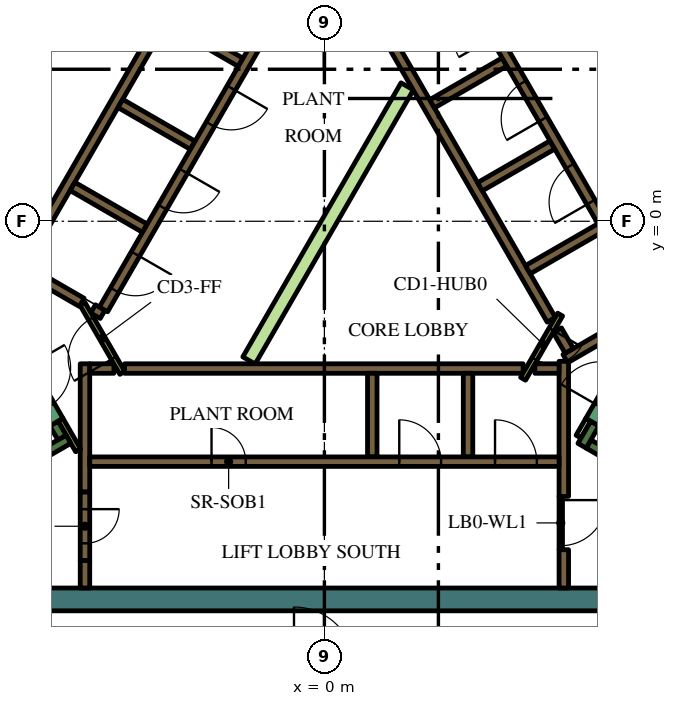
"""IFC4 building model, lengths in metres.
Left out: names, types, materials, properties, quantities, classifications, styles, units other than length and angle.
Written with IfcOpenShell. Run it as: python <this file> out.ifc"""

import sys

from ifc_helpers import new_model, si_unit, direction, frame, frame_2d, origin, place, context, subcontext, project, spatial, polyline, rectangle, outline, extrude, element, fill, save


model = new_model("IFC4")
c1 = context("Model", 3, precision=1e-05, world=origin(), true_north=direction((0.0, 1.0)))
c2 = subcontext(c1, "Body", "Model", "MODEL_VIEW")
j1 = project(units=[si_unit("LENGTHUNIT", "METRE"), si_unit("PLANEANGLEUNIT", "RADIAN")], contexts=[c1])
p1 = place(None, origin())
s1 = spatial("IfcSite", under=j1, at=p1, CompositionType="ELEMENT")
p2 = place(p1, origin())
s2 = spatial("IfcBuilding", under=s1, at=p2, CompositionType="ELEMENT")
p3 = place(p2, frame((0.0, 0.0, 340.2)))
s3 = spatial("IfcBuildingStorey", under=s2, at=p3, CompositionType="ELEMENT", Elevation=340.2)
p4 = place(p3, frame((8.904, -9.95, 0.0), z_axis=(0.0, 0.0, 1.0), x_axis=(-1.0, 0.0, 0.0)))
e1 = element("IfcWall", 1, at=p4, inside=s3, PredefinedType="SOLIDWALL", context=c2, shape_type="SweptSolid", body=[
    extrude(rectangle(XDim=22.161, YDim=0.6, at=frame_2d((11.081, 0.0))), origin(), (0.0, 0.0, 1.0), 4.2),
])
p5 = place(p3, frame((-4.652, 11.842, 0.0), z_axis=(0.0, 0.0, 1.0), x_axis=(-0.500003640647, -0.866023301845, 0.0)))
e2 = element("IfcWall", 2, at=p5, inside=s3, PredefinedType="SOLIDWALL", context=c2, shape_type="SweptSolid", body=[
    extrude(rectangle(XDim=15.858, YDim=0.6, at=frame_2d((7.929, 0.0))), origin(), (0.0, 0.0, 1.0), 4.2),
])
p6 = place(p3, frame((12.84, -9.261, 0.0), z_axis=(0.0, 0.0, 1.0), x_axis=(-0.866013990052, 0.500019768644, 0.0)))
e3 = element("IfcWall", 3, at=p6, inside=s3, PredefinedType="SOLIDWALL", context=c2, shape_type="SweptSolid", body=[
    extrude(rectangle(XDim=6.8, YDim=0.25, at=frame_2d((3.4, 0.0))), origin(), (0.0, 0.0, 1.0), 4.2),
])
p7 = place(p3, frame((6.78, -5.906, 0.0), z_axis=(0.0, 0.0, 1.0), x_axis=(0.500223362819, 0.865896406789, 0.0)))
e4 = element("IfcWall", 4, at=p7, inside=s3, PredefinedType="SOLIDWALL", context=c2, shape_type="SweptSolid", body=[
    extrude(rectangle(XDim=0.675, YDim=0.25, at=frame_2d((0.337, 0.0))), origin(), (0.0, 0.0, 1.0), 4.2),
])
p8 = place(p3, frame((-12.84, -9.261, 0.0), z_axis=(0.0, 0.0, 1.0), x_axis=(0.866016039709, 0.500016218704, 0.0)))
e5 = element("IfcWall", 5, at=p8, inside=s3, PredefinedType="SOLIDWALL", context=c2, shape_type="SweptSolid", body=[
    extrude(rectangle(XDim=7.05, YDim=0.25, at=frame_2d((3.525, 0.0))), origin(), (0.0, 0.0, 1.0), 4.2),
])
p9 = place(p3, frame((-6.905, -5.69, 0.0), z_axis=(0.0, 0.0, 1.0), x_axis=(-0.500402024738, 0.865793170242, 0.0)))
e6 = element("IfcWall", 6, at=p9, inside=s3, PredefinedType="SOLIDWALL", context=c2, shape_type="SweptSolid", body=[
    extrude(rectangle(XDim=0.425, YDim=0.25, at=frame_2d((0.212, 0.0))), origin(), (0.0, 0.0, 1.0), 4.2),
])
p10 = place(p3, frame((6.3, -7.24, 0.0), z_axis=(0.0, 0.0, 1.0), x_axis=(0.0, 1.0, 0.0)))
e7 = element("IfcWall", 7, at=p10, inside=s3, PredefinedType="SOLIDWALL", context=c2, shape_type="SweptSolid", body=[
    extrude(rectangle(XDim=3.556, YDim=0.25, at=frame_2d((1.778, 0.0))), origin(), (0.0, 0.0, 1.0), 4.2),
])
p11 = place(p3, frame((6.3, -9.65, 0.0), z_axis=(0.0, 0.0, 1.0), x_axis=(0.0, 1.0, 0.0)))
e8 = element("IfcWall", 8, at=p11, inside=s3, PredefinedType="SOLIDWALL", context=c2, shape_type="SweptSolid", body=[
    extrude(rectangle(XDim=1.008, YDim=0.25, at=frame_2d((0.504, 0.0))), origin(), (0.0, 0.0, 1.0), 4.2),
])
p12 = place(p3, frame((5.538, -3.875, 0.0), z_axis=(0.0, 0.0, 1.0), x_axis=(1.0, 0.0, 0.0)))
e9 = element("IfcWall", 9, at=p12, inside=s3, PredefinedType="SOLIDWALL", context=c2, shape_type="SweptSolid", body=[
    extrude(rectangle(XDim=0.637, YDim=0.25, at=frame_2d((0.318, 0.0))), origin(), (0.0, 0.0, 1.0), 4.2),
])
p13 = place(p3, frame((-5.259, -3.875, 0.0), z_axis=(0.0, 0.0, 1.0), x_axis=(1.0, 0.0, 0.0)))
e10 = element("IfcWall", 10, at=p13, inside=s3, PredefinedType="SOLIDWALL", context=c2, shape_type="SweptSolid", body=[
    extrude(rectangle(XDim=10.489, YDim=0.25, at=frame_2d((5.244, 0.0))), origin(), (0.0, 0.0, 1.0), 4.2),
])
for number, where, z_axis, x_axis in (
    (11, (1.26, -4.0, 0.0), (0.0, 0.0, 1.0), (0.0, -1.0, 0.0)),
    (12, (3.78, -4.0, 0.0), (0.0, 0.0, 1.0), (0.0, -1.0, 0.0)),
):
    element("IfcWall", number, at=place(p3, frame(where, z_axis=z_axis, x_axis=x_axis)), inside=s3, PredefinedType="SOLIDWALL", context=c2, shape_type="SweptSolid", body=[
        extrude(rectangle(XDim=2.2, YDim=0.25, at=frame_2d((1.1, 0.0))), origin(), (0.0, 0.0, 1.0), 4.2),
    ])
p14 = place(p3, frame((-6.3, -7.125, 0.0), z_axis=(0.0, 0.0, 1.0), x_axis=(0.0, 1.0, 0.0)))
e13 = element("IfcWall", 13, at=p14, inside=s3, PredefinedType="SOLIDWALL", context=c2, shape_type="SweptSolid", body=[
    extrude(rectangle(XDim=3.375, YDim=0.25, at=frame_2d((1.687, 0.0))), origin(), (0.0, 0.0, 1.0), 4.2),
])
p15 = place(p3, frame((-6.175, -3.875, 0.0), z_axis=(0.0, 0.0, 1.0), x_axis=(1.0, 0.0, 0.0)))
e14 = element("IfcWall", 14, at=p15, inside=s3, PredefinedType="SOLIDWALL", context=c2, shape_type="SweptSolid", body=[
    extrude(rectangle(XDim=0.637, YDim=0.25, at=frame_2d((0.318, 0.0))), origin(), (0.0, 0.0, 1.0), 4.2),
])
p16 = place(p3, frame((-6.3, -8.925, 0.0), z_axis=(0.0, 0.0, 1.0), x_axis=(0.0, -1.0, 0.0)))
e15 = element("IfcWall", 15, at=p16, inside=s3, PredefinedType="SOLIDWALL", context=c2, shape_type="SweptSolid", body=[
    extrude(rectangle(XDim=0.725, YDim=0.25, at=frame_2d((0.363, 0.0))), origin(), (0.0, 0.0, 1.0), 4.2),
])
p17 = place(p3, frame((9.19, -1.969, 0.0), z_axis=(0.0, 0.0, 1.0), x_axis=(-0.866057109641, -0.499945079824, 0.0)))
e16 = element("IfcWall", 16, at=p17, inside=s3, PredefinedType="SOLIDWALL", context=c2, shape_type="SweptSolid", body=[
    extrude(rectangle(XDim=3.291, YDim=0.25, at=frame_2d((1.646, 0.0))), origin(), (0.0, 0.0, 1.0), 4.2),
])
p18 = place(p3, frame((6.13, -2.867, 0.0), z_axis=(0.0, 0.0, 1.0), x_axis=(0.500160776593, -0.865932559475, 0.0)))
e17 = element("IfcWall", 17, at=p18, inside=s3, PredefinedType="SOLIDWALL", context=c2, shape_type="SweptSolid", body=[
    extrude(rectangle(XDim=0.627, YDim=0.25, at=frame_2d((0.313, 0.0))), origin(), (0.0, 0.0, 1.0), 4.2),
])
p19 = place(p3, frame((5.97, -2.591, 0.0), z_axis=(0.0, 0.0, 1.0), x_axis=(-0.499994469932, 0.866028596547, 0.0)))
e18 = element("IfcWall", 18, at=p19, inside=s3, PredefinedType="SOLIDWALL", context=c2, shape_type="SweptSolid", body=[
    extrude(rectangle(XDim=10.488, YDim=0.25, at=frame_2d((5.244, 0.0))), origin(), (0.0, 0.0, 1.0), 4.2),
])
for number, where, z_axis, x_axis in (
    (19, (2.834, 3.091, 0.0), (0.0, 0.0, 1.0), (0.866, 0.5, 0.0)),
    (20, (4.094, 0.909, 0.0), (0.0, 0.0, 1.0), (0.866, 0.5, 0.0)),
    (21, (5.354, -1.274, 0.0), (0.0, 0.0, 1.0), (0.866, 0.5, 0.0)),
):
    element("IfcWall", number, at=place(p3, frame(where, z_axis=z_axis, x_axis=x_axis)), inside=s3, PredefinedType="SOLIDWALL", context=c2, shape_type="SweptSolid", body=[
        extrude(rectangle(XDim=2.2, YDim=0.25, at=frame_2d((1.1, 0.0))), origin(), (0.0, 0.0, 1.0), 4.2),
    ])
p20 = place(p3, frame((-8.06, -1.311, 0.0), z_axis=(0.0, 0.0, 1.0), x_axis=(0.50000273126, 0.866023826885, 0.0)))
e22 = element("IfcWall", 22, at=p20, inside=s3, PredefinedType="SOLIDWALL", context=c2, shape_type="SweptSolid", body=[
    extrude(rectangle(XDim=10.33, YDim=0.25, at=frame_2d((5.165, 0.0))), origin(), (0.0, 0.0, 1.0), 4.2),
])
for number, where, z_axis, x_axis in (
    (23, (-2.204, 4.182, 0.0), (0.0, 0.0, 1.0), (-0.866, 0.5, 0.0)),
    (24, (-5.369, 3.1, 0.0), (0.0, 0.0, 1.0), (0.866, -0.5, 0.0)),
    (25, (-4.724, -0.182, 0.0), (0.0, 0.0, 1.0), (-0.866, 0.5, 0.0)),
):
    element("IfcWall", number, at=place(p3, frame(where, z_axis=z_axis, x_axis=x_axis)), inside=s3, PredefinedType="SOLIDWALL", context=c2, shape_type="SweptSolid", body=[
        extrude(rectangle(XDim=2.2, YDim=0.25, at=frame_2d((1.1, 0.0))), origin(), (0.0, 0.0, 1.0), 4.2),
    ])
p21 = place(p3, frame((-6.088, -2.305, 0.0), z_axis=(0.0, 0.0, 1.0), x_axis=(0.866059450854, -0.499941024108, 0.0)))
e26 = element("IfcWall", 26, at=p21, inside=s3, PredefinedType="SOLIDWALL", context=c2, shape_type="SweptSolid", body=[
    extrude(rectangle(XDim=0.29, YDim=0.25, at=frame_2d((0.145, 0.0))), origin(), (0.0, 0.0, 1.0), 4.2),
])
p22 = place(p3, frame((-7.889, -1.265, 0.0), z_axis=(0.0, 0.0, 1.0), x_axis=(0.865986741702, -0.500066958712, 0.0)))
e27 = element("IfcWall", 27, at=p22, inside=s3, PredefinedType="SOLIDWALL", context=c2, shape_type="SweptSolid", body=[
    extrude(rectangle(XDim=1.738, YDim=0.25, at=frame_2d((0.869, 0.0))), origin(), (0.0, 0.0, 1.0), 4.2),
])
p23 = place(p3, frame((-6.48, -6.027, 0.0), z_axis=(0.0, 0.0, 1.0), x_axis=(-0.499927229454, 0.866067413802, 0.0)))
e28 = element("IfcWall", 28, at=p23, inside=s3, PredefinedType="PARTITIONING", context=c2, shape_type="SweptSolid", body=[
    extrude(rectangle(XDim=0.929, YDim=0.15, at=frame_2d((0.464, 0.0))), origin(), (0.0, 0.0, 1.0), 4.2),
])
p24 = place(p3, frame((6.945, -5.222, 0.0), z_axis=(0.0, 0.0, 1.0), x_axis=(-0.499818422106, -0.866130212453, 0.0)))
e29 = element("IfcWall", 29, at=p24, inside=s3, PredefinedType="PARTITIONING", context=c2, shape_type="SweptSolid", body=[
    extrude(rectangle(XDim=0.514, YDim=0.15, at=frame_2d((0.257, 0.0))), origin(), (0.0, 0.0, 1.0), 3.45),
])
p25 = place(p3, origin())
e30 = element("IfcWall", 30, at=p25, inside=s3, PredefinedType="PARTITIONING", context=c2, shape_type="SweptSolid", body=[
    extrude(outline(polyline([(2.017, 3.643), (2.342, 3.456), (-1.822, -3.756), (-2.147, -3.568), (2.017, 3.643)])), origin(), (0.0, 0.0, 1.0), 3.45),
])
p26 = place(p3, frame((-6.175, -6.325, 0.0), z_axis=(0.0, 0.0, 1.0), x_axis=(1.0, 0.0, 0.0)))
e31 = element("IfcWall", 31, at=p26, inside=s3, PredefinedType="SOLIDWALL", context=c2, shape_type="SweptSolid", body=[
    extrude(rectangle(XDim=12.35, YDim=0.25, at=frame_2d((6.175, 0.0))), origin(), (0.0, 0.0, 1.0), 4.2),
])
p27 = place(p26, frame((3.205, 0.0, 0.0)))
e32 = element("IfcOpeningElement", 32, at=p27, cuts=e31, PredefinedType="OPENING", context=c2, shape_type="SweptSolid", body=[
    extrude(rectangle(XDim=0.9, YDim=2.1, at=frame_2d((0.45, 1.05))), frame((0.0, 0.135, 0.0), z_axis=(0.0, -1.0, 0.0), x_axis=(1.0, 0.0, 0.0)), (0.0, 0.0, 1.0), 0.27),
])
p28 = place(p26, frame((8.145, 0.0, 0.0)))
e33 = element("IfcOpeningElement", 33, at=p28, cuts=e31, PredefinedType="OPENING", context=c2, shape_type="SweptSolid", body=[
    extrude(rectangle(XDim=1.1, YDim=2.1, at=frame_2d((0.55, 1.05))), frame((0.0, 0.135, 0.0), z_axis=(0.0, -1.0, 0.0), x_axis=(1.0, 0.0, 0.0)), (0.0, 0.0, 1.0), 0.27),
])
p29 = place(p26, frame((10.665, 0.0, 0.0)))
e34 = element("IfcOpeningElement", 34, at=p29, cuts=e31, PredefinedType="OPENING", context=c2, shape_type="SweptSolid", body=[
    extrude(rectangle(XDim=1.1, YDim=2.1, at=frame_2d((0.55, 1.05))), frame((0.0, 0.135, 0.0), z_axis=(0.0, -1.0, 0.0), x_axis=(1.0, 0.0, 0.0)), (0.0, 0.0, 1.0), 0.27),
])
p30 = place(p3, frame((8.565, -2.185, 0.0), z_axis=(0.0, 0.0, 1.0), x_axis=(-0.499997954832, 0.866026584559, 0.0)))
e35 = element("IfcWall", 35, at=p30, inside=s3, PredefinedType="SOLIDWALL", context=c2, shape_type="SweptSolid", body=[
    extrude(rectangle(XDim=12.35, YDim=0.25, at=frame_2d((6.175, 0.0))), origin(), (0.0, 0.0, 1.0), 4.2),
])
p31 = place(p30, frame((0.685, 0.0, 0.0)))
e36 = element("IfcOpeningElement", 36, at=p31, cuts=e35, PredefinedType="OPENING", context=c2, shape_type="SweptSolid", body=[
    extrude(rectangle(XDim=0.9, YDim=2.1, at=frame_2d((0.45, 1.05))), frame((0.0, 0.135, 0.0), z_axis=(0.0, -1.0, 0.0), x_axis=(1.0, 0.0, 0.0)), (0.0, 0.0, 1.0), 0.27),
])
p32 = place(p30, frame((3.105, 0.0, 0.0)))
e37 = element("IfcOpeningElement", 37, at=p32, cuts=e35, PredefinedType="OPENING", context=c2, shape_type="SweptSolid", body=[
    extrude(rectangle(XDim=1.1, YDim=2.1, at=frame_2d((0.55, 1.05))), frame((0.0, 0.135, 0.0), z_axis=(0.0, -1.0, 0.0), x_axis=(1.0, 0.0, 0.0)), (0.0, 0.0, 1.0), 0.27),
])
p33 = place(p30, frame((5.625, 0.0, 0.0)))
e38 = element("IfcOpeningElement", 38, at=p33, cuts=e35, PredefinedType="OPENING", context=c2, shape_type="SweptSolid", body=[
    extrude(rectangle(XDim=1.1, YDim=2.1, at=frame_2d((0.55, 1.05))), frame((0.0, 0.135, 0.0), z_axis=(0.0, -1.0, 0.0), x_axis=(1.0, 0.0, 0.0)), (0.0, 0.0, 1.0), 0.27),
])
p34 = place(p30, frame((8.145, 0.0, 0.0)))
e39 = element("IfcOpeningElement", 39, at=p34, cuts=e35, PredefinedType="OPENING", context=c2, shape_type="SweptSolid", body=[
    extrude(rectangle(XDim=1.1, YDim=2.1, at=frame_2d((0.55, 1.05))), frame((0.0, 0.135, 0.0), z_axis=(0.0, -1.0, 0.0), x_axis=(1.0, 0.0, 0.0)), (0.0, 0.0, 1.0), 0.27),
])
p35 = place(p30, frame((10.665, 0.0, 0.0)))
e40 = element("IfcOpeningElement", 40, at=p35, cuts=e35, PredefinedType="OPENING", context=c2, shape_type="SweptSolid", body=[
    extrude(rectangle(XDim=1.1, YDim=2.1, at=frame_2d((0.55, 1.05))), frame((0.0, 0.135, 0.0), z_axis=(0.0, -1.0, 0.0), x_axis=(1.0, 0.0, 0.0)), (0.0, 0.0, 1.0), 0.27),
])
p36 = place(p3, frame((-0.898, 6.194, 0.0), z_axis=(0.0, 0.0, 1.0), x_axis=(-0.499996202215, -0.866027596426, 0.0)))
e41 = element("IfcWall", 41, at=p36, inside=s3, PredefinedType="SOLIDWALL", context=c2, shape_type="SweptSolid", body=[
    extrude(rectangle(XDim=9.83, YDim=0.25, at=frame_2d((4.915, 0.0))), origin(), (0.0, 0.0, 1.0), 4.2),
])
p37 = place(p36, frame((0.585, 0.0, 0.0)))
e42 = element("IfcOpeningElement", 42, at=p37, cuts=e41, PredefinedType="OPENING", context=c2, shape_type="SweptSolid", body=[
    extrude(rectangle(XDim=1.1, YDim=2.1, at=frame_2d((0.55, 1.05))), frame((0.0, 0.135, 0.0), z_axis=(0.0, -1.0, 0.0), x_axis=(1.0, 0.0, 0.0)), (0.0, 0.0, 1.0), 0.27),
])
p38 = place(p36, frame((3.105, 0.0, 0.0)))
e43 = element("IfcOpeningElement", 43, at=p38, cuts=e41, PredefinedType="OPENING", context=c2, shape_type="SweptSolid", body=[
    extrude(rectangle(XDim=1.1, YDim=2.1, at=frame_2d((0.55, 1.05))), frame((0.0, 0.135, 0.0), z_axis=(0.0, -1.0, 0.0), x_axis=(1.0, 0.0, 0.0)), (0.0, 0.0, 1.0), 0.27),
])
p39 = place(p36, frame((5.625, 0.0, 0.0)))
e44 = element("IfcOpeningElement", 44, at=p39, cuts=e41, PredefinedType="OPENING", context=c2, shape_type="SweptSolid", body=[
    extrude(rectangle(XDim=1.1, YDim=2.1, at=frame_2d((0.55, 1.05))), frame((0.0, 0.135, 0.0), z_axis=(0.0, -1.0, 0.0), x_axis=(1.0, 0.0, 0.0)), (0.0, 0.0, 1.0), 0.27),
])
p40 = place(p36, frame((8.145, 0.0, 0.0)))
e45 = element("IfcOpeningElement", 45, at=p40, cuts=e41, PredefinedType="OPENING", context=c2, shape_type="SweptSolid", body=[
    extrude(rectangle(XDim=1.1, YDim=2.1, at=frame_2d((0.55, 1.05))), frame((0.0, 0.135, 0.0), z_axis=(0.0, -1.0, 0.0), x_axis=(1.0, 0.0, 0.0)), (0.0, 0.0, 1.0), 0.27),
])
p41 = place(p3, frame((7.053, -5.284, 0.0), z_axis=(0.0, 0.0, 1.0), x_axis=(0.500078061341, 0.865980330357, 0.0)))
e46 = element("IfcWall", 46, at=p41, inside=s3, PredefinedType="SOLIDWALL", context=c2, shape_type="SweptSolid", body=[
    extrude(rectangle(XDim=2.1, YDim=0.4, at=frame_2d((1.05, 0.0))), origin(), (0.0, 0.0, 1.0), 4.2),
])
p42 = place(p41, frame((0.45, 0.0, 0.0)))
e47 = element("IfcOpeningElement", 47, at=p42, cuts=e46, PredefinedType="OPENING", context=c2, shape_type="SweptSolid", body=[
    extrude(rectangle(XDim=1.2, YDim=2.1, at=frame_2d((0.6, 1.05))), frame((0.0, 0.21, 0.0), z_axis=(0.0, -1.0, 0.0), x_axis=(1.0, 0.0, 0.0)), (0.0, 0.0, 1.0), 0.42),
])
p43 = place(p3, frame((-8.103, -3.466, 0.0), z_axis=(0.0, 0.0, 1.0), x_axis=(0.500078061341, -0.865980330357, 0.0)))
e48 = element("IfcWall", 48, at=p43, inside=s3, PredefinedType="SOLIDWALL", context=c2, shape_type="SweptSolid", body=[
    extrude(rectangle(XDim=2.1, YDim=0.4, at=frame_2d((1.05, 0.0))), origin(), (0.0, 0.0, 1.0), 4.2),
])
p44 = place(p43, frame((0.45, 0.0, 0.0)))
e49 = element("IfcOpeningElement", 49, at=p44, cuts=e48, PredefinedType="OPENING", context=c2, shape_type="SweptSolid", body=[
    extrude(rectangle(XDim=1.2, YDim=2.1, at=frame_2d((0.6, 1.05))), frame((0.0, 0.21, 0.0), z_axis=(0.0, -1.0, 0.0), x_axis=(1.0, 0.0, 0.0)), (0.0, 0.0, 1.0), 0.42),
])
p45 = place(p3, frame((-6.3, -7.125, 0.0), z_axis=(0.0, 0.0, 1.0), x_axis=(0.0, -1.0, 0.0)))
e50 = element("IfcWall", 50, at=p45, inside=s3, PredefinedType="SOLIDWALL", context=c2, shape_type="SweptSolid", body=[
    extrude(rectangle(XDim=1.8, YDim=0.25, at=frame_2d((0.9, 0.0))), origin(), (0.0, 0.0, 1.0), 4.2),
])
p46 = place(p45, frame((0.45, 0.0, 0.0)))
e51 = element("IfcOpeningElement", 51, at=p46, cuts=e50, PredefinedType="OPENING", context=c2, shape_type="SweptSolid", body=[
    extrude(rectangle(XDim=0.9, YDim=2.1, at=frame_2d((0.45, 1.05))), frame((0.0, 0.135, 0.0), z_axis=(0.0, -1.0, 0.0), x_axis=(1.0, 0.0, 0.0)), (0.0, 0.0, 1.0), 0.27),
])
p47 = place(p3, frame((6.203, -2.456, 0.0), z_axis=(0.0, 0.0, 1.0), x_axis=(-0.500043961785, -0.866000020948, 0.0)))
e52 = element("IfcWall", 52, at=p47, inside=s3, PredefinedType="PARTITIONING", context=c2, shape_type="SweptSolid", body=[
    extrude(rectangle(XDim=1.95, YDim=0.15, at=frame_2d((0.975, 0.0))), origin(), (0.0, 0.0, 1.0), 4.2),
])
p48 = place(p47, frame((0.45, 0.0, 0.0)))
e53 = element("IfcOpeningElement", 53, at=p48, cuts=e52, PredefinedType="OPENING", context=c2, shape_type="SweptSolid", body=[
    extrude(rectangle(XDim=0.9, YDim=2.1, at=frame_2d((0.45, 1.05))), frame((0.0, 0.085, 0.0), z_axis=(0.0, -1.0, 0.0), x_axis=(1.0, 0.0, 0.0)), (0.0, 0.0, 1.0), 0.17),
])
p49 = place(p3, frame((-5.317, -3.99, 0.0), z_axis=(0.0, 0.0, 1.0), x_axis=(-0.500027713859, 0.866009402589, 0.0)))
e54 = element("IfcWall", 54, at=p49, inside=s3, PredefinedType="PARTITIONING", context=c2, shape_type="SweptSolid", body=[
    extrude(rectangle(XDim=2.1, YDim=0.15, at=frame_2d((1.05, 0.0))), origin(), (0.0, 0.0, 1.0), 4.2),
])
p50 = place(p49, frame((0.45, 0.0, 0.0)))
e55 = element("IfcOpeningElement", 55, at=p50, cuts=e54, PredefinedType="OPENING", context=c2, shape_type="SweptSolid", body=[
    extrude(rectangle(XDim=1.2, YDim=2.1, at=frame_2d((0.6, 1.05))), frame((0.0, 0.085, 0.0), z_axis=(0.0, -1.0, 0.0), x_axis=(1.0, 0.0, 0.0)), (0.0, 0.0, 1.0), 0.17),
])
p51 = place(p3, frame((6.22, -7.237, 0.0), z_axis=(0.0, 0.0, 1.0), x_axis=(0.0, -1.0, 0.0)))
e56 = element("IfcWall", 56, at=p51, inside=s3, PredefinedType="PARTITIONING", context=c2, shape_type="SweptSolid", body=[
    extrude(rectangle(XDim=1.4, YDim=0.09, at=frame_2d((0.7, 0.0))), origin(), (0.0, 0.0, 1.0), 3.45),
])
p52 = place(p51, frame((0.1, 0.0, 0.0)))
e57 = element("IfcOpeningElement", 57, at=p52, cuts=e56, PredefinedType="OPENING", context=c2, shape_type="SweptSolid", body=[
    extrude(rectangle(XDim=1.2, YDim=2.1, at=frame_2d((0.6, 1.05))), frame((0.0, 0.055, 0.0), z_axis=(0.0, -1.0, 0.0), x_axis=(1.0, 0.0, 0.0)), (0.0, 0.0, 1.0), 0.11),
])
p53 = place(p27, origin())
e58 = element("IfcDoor", 58, at=p53, inside=s3, OperationType="SINGLE_SWING_LEFT", PredefinedType="DOOR", context=c2, shape_type="SweptSolid", body=[
    extrude(rectangle(XDim=0.9, YDim=2.1, at=frame_2d((0.45, 1.05))), frame((0.0, 0.025, 0.0), z_axis=(0.0, -1.0, 0.0), x_axis=(1.0, 0.0, 0.0)), (0.0, 0.0, 1.0), 0.05),
])
fill(e32, e58)
p54 = place(p28, origin())
e59 = element("IfcDoor", 59, at=p54, inside=s3, OperationType="DOUBLE_DOOR_SLIDING", PredefinedType="DOOR", context=c2, shape_type="SweptSolid", body=[
    extrude(rectangle(XDim=1.1, YDim=2.1, at=frame_2d((0.55, 1.05))), frame((0.0, 0.025, 0.0), z_axis=(0.0, -1.0, 0.0), x_axis=(1.0, 0.0, 0.0)), (0.0, 0.0, 1.0), 0.05),
])
fill(e33, e59)
p55 = place(p29, origin())
e60 = element("IfcDoor", 60, at=p55, inside=s3, OperationType="DOUBLE_DOOR_SLIDING", PredefinedType="DOOR", context=c2, shape_type="SweptSolid", body=[
    extrude(rectangle(XDim=1.1, YDim=2.1, at=frame_2d((0.55, 1.05))), frame((0.0, 0.025, 0.0), z_axis=(0.0, -1.0, 0.0), x_axis=(1.0, 0.0, 0.0)), (0.0, 0.0, 1.0), 0.05),
])
fill(e34, e60)
p56 = place(p32, origin())
e61 = element("IfcDoor", 61, at=p56, inside=s3, OperationType="DOUBLE_DOOR_SLIDING", PredefinedType="DOOR", context=c2, shape_type="SweptSolid", body=[
    extrude(rectangle(XDim=1.1, YDim=2.1, at=frame_2d((0.55, 1.05))), frame((0.0, 0.025, 0.0), z_axis=(0.0, -1.0, 0.0), x_axis=(1.0, 0.0, 0.0)), (0.0, 0.0, 1.0), 0.05),
])
fill(e37, e61)
p57 = place(p33, origin())
e62 = element("IfcDoor", 62, at=p57, inside=s3, OperationType="DOUBLE_DOOR_SLIDING", PredefinedType="DOOR", context=c2, shape_type="SweptSolid", body=[
    extrude(rectangle(XDim=1.1, YDim=2.1, at=frame_2d((0.55, 1.05))), frame((0.0, 0.025, 0.0), z_axis=(0.0, -1.0, 0.0), x_axis=(1.0, 0.0, 0.0)), (0.0, 0.0, 1.0), 0.05),
])
fill(e38, e62)
p58 = place(p38, origin())
e63 = element("IfcDoor", 63, at=p58, inside=s3, OperationType="DOUBLE_DOOR_SLIDING", PredefinedType="DOOR", context=c2, shape_type="SweptSolid", body=[
    extrude(rectangle(XDim=1.1, YDim=2.1, at=frame_2d((0.55, 1.05))), frame((0.0, 0.025, 0.0), z_axis=(0.0, -1.0, 0.0), x_axis=(1.0, 0.0, 0.0)), (0.0, 0.0, 1.0), 0.05),
])
fill(e43, e63)
p59 = place(p39, origin())
e64 = element("IfcDoor", 64, at=p59, inside=s3, OperationType="DOUBLE_DOOR_SLIDING", PredefinedType="DOOR", context=c2, shape_type="SweptSolid", body=[
    extrude(rectangle(XDim=1.1, YDim=2.1, at=frame_2d((0.55, 1.05))), frame((0.0, 0.025, 0.0), z_axis=(0.0, -1.0, 0.0), x_axis=(1.0, 0.0, 0.0)), (0.0, 0.0, 1.0), 0.05),
])
fill(e44, e64)
p60 = place(p40, origin())
e65 = element("IfcDoor", 65, at=p60, inside=s3, OperationType="DOUBLE_DOOR_SLIDING", PredefinedType="DOOR", context=c2, shape_type="SweptSolid", body=[
    extrude(rectangle(XDim=1.1, YDim=2.1, at=frame_2d((0.55, 1.05))), frame((0.0, 0.025, 0.0), z_axis=(0.0, -1.0, 0.0), x_axis=(1.0, 0.0, 0.0)), (0.0, 0.0, 1.0), 0.05),
])
fill(e45, e65)
p61 = place(p46, origin())
e66 = element("IfcDoor", 66, at=p61, inside=s3, OperationType="SINGLE_SWING_LEFT", PredefinedType="DOOR", context=c2, shape_type="SweptSolid", body=[
    extrude(rectangle(XDim=0.9, YDim=2.1, at=frame_2d((0.45, 1.05))), frame((0.0, 0.025, 0.0), z_axis=(0.0, -1.0, 0.0), x_axis=(1.0, 0.0, 0.0)), (0.0, 0.0, 1.0), 0.05),
])
fill(e51, e66)
p62 = place(p48, origin())
e67 = element("IfcDoor", 67, at=p62, inside=s3, OperationType="SINGLE_SWING_LEFT", PredefinedType="DOOR", context=c2, shape_type="SweptSolid", body=[
    extrude(rectangle(XDim=0.9, YDim=2.1, at=frame_2d((0.45, 1.05))), frame((0.0, 0.025, 0.0), z_axis=(0.0, -1.0, 0.0), x_axis=(1.0, 0.0, 0.0)), (0.0, 0.0, 1.0), 0.05),
])
fill(e53, e67)
p63 = place(p50, origin())
e68 = element("IfcDoor", 68, at=p63, inside=s3, OperationType="SINGLE_SWING_LEFT", PredefinedType="DOOR", context=c2, shape_type="SweptSolid", body=[
    extrude(rectangle(XDim=1.2, YDim=2.1, at=frame_2d((0.6, 1.05))), frame((0.0, 0.025, 0.0), z_axis=(0.0, -1.0, 0.0), x_axis=(1.0, 0.0, 0.0)), (0.0, 0.0, 1.0), 0.05),
])
fill(e55, e68)
p64 = place(p52, origin())
e69 = element("IfcDoor", 69, at=p64, inside=s3, OperationType="SINGLE_SWING_LEFT", PredefinedType="DOOR", context=c2, shape_type="SweptSolid", body=[
    extrude(rectangle(XDim=1.2, YDim=2.1, at=frame_2d((0.6, 1.05))), frame((0.0, 0.025, 0.0), z_axis=(0.0, -1.0, 0.0), x_axis=(1.0, 0.0, 0.0)), (0.0, 0.0, 1.0), 0.05),
])
fill(e57, e69)
save(model, sys.argv[1])
